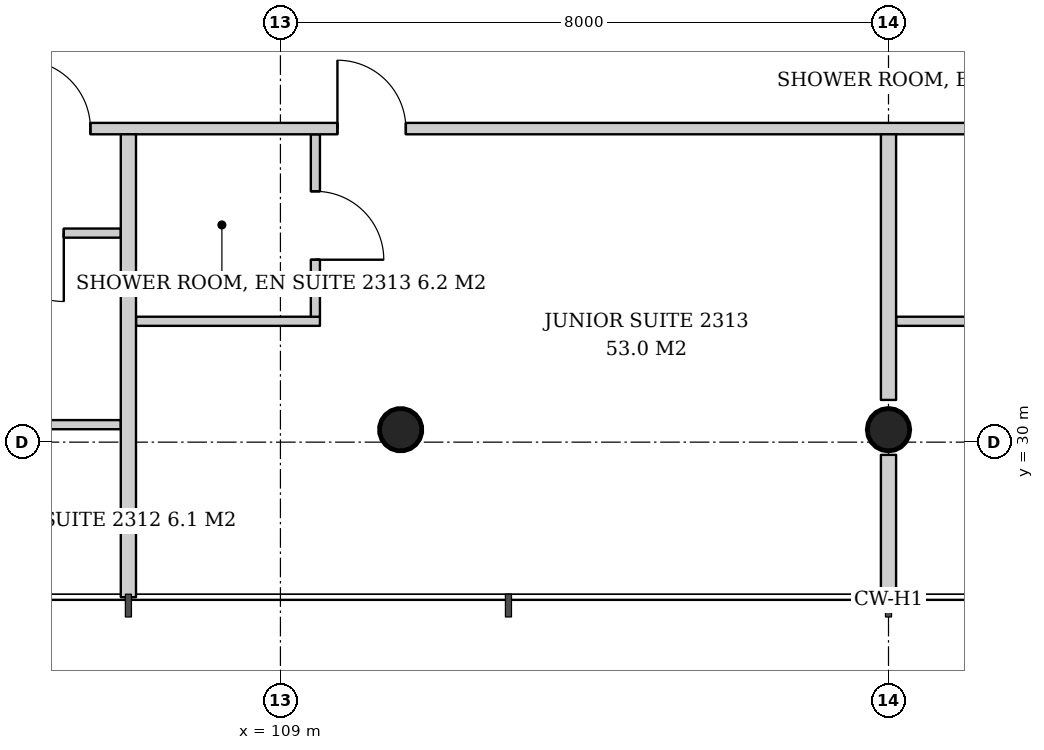
"""IFC4 building model, lengths in metres.
Left out: names, types, materials, properties, quantities, classifications, styles, units other than length and angle.
Written with IfcOpenShell. Run it as: python <this file> out.ifc"""

import sys

from ifc_helpers import new_model, si_unit, direction, frame, frame_2d, origin, origin_2d, place, context, subcontext, project, spatial, rectangle, hollow_circle, extrude, element, fill, save


model = new_model("IFC4")
c1 = context("Model", 3, precision=1e-05, world=origin(), true_north=direction((0.0, 1.0)))
c2 = subcontext(c1, "Body", "Model", "MODEL_VIEW")
j1 = project(units=[si_unit("LENGTHUNIT", "METRE"), si_unit("PLANEANGLEUNIT", "RADIAN")], contexts=[c1])
p1 = place(None, origin())
s1 = spatial("IfcSite", under=j1, at=p1, CompositionType="ELEMENT")
p2 = place(p1, origin())
s2 = spatial("IfcBuilding", under=s1, at=p2, CompositionType="ELEMENT")
p3 = place(p2, frame((0.0, 0.0, 93.2)))
s3 = spatial("IfcBuildingStorey", under=s2, at=p3, CompositionType="ELEMENT", Elevation=93.2)
p4 = place(p3, frame((110.556, 30.112, 0.0), z_axis=(0.021497706284, 0.043059584825, 0.998841188968), x_axis=(-0.894693706707, 0.446680166538, 0.0)))
e1 = element("IfcColumn", 1, at=p4, inside=s3, PredefinedType="COLUMN", context=c2, shape_type="SweptSolid", body=[
    extrude(hollow_circle(Radius=0.28, WallThickness=0.02, at=origin_2d()), origin(), (0.0, 0.0, 1.0), 3.804),
])
p5 = place(p3, frame((117.0, 30.112, 0.0), z_axis=(0.0, 0.043069538298, 0.999072076915), x_axis=(-1.0, 0.0, 0.0)))
e2 = element("IfcColumn", 2, at=p5, inside=s3, PredefinedType="COLUMN", context=c2, shape_type="SweptSolid", body=[
    extrude(hollow_circle(Radius=0.28, WallThickness=0.02, at=origin_2d()), origin(), (0.0, 0.0, 1.0), 3.803),
])
p6 = place(p3, frame((106.9, 32.75, 0.0), z_axis=(0.0, 0.0, 1.0), x_axis=(-1.0, 0.0, 0.0)))
e3 = element("IfcWall", 3, at=p6, inside=s3, PredefinedType="PARTITIONING", context=c2, shape_type="SweptSolid", body=[
    extrude(rectangle(XDim=2.58, YDim=0.12, at=frame_2d((1.29, 0.0))), origin(), (0.0, 0.0, 1.0), 3.2),
])
p7 = place(p6, frame((0.75, 0.0, 0.0)))
e4 = element("IfcOpeningElement", 4, at=p7, cuts=e3, PredefinedType="OPENING", context=c2, shape_type="SweptSolid", body=[
    extrude(rectangle(XDim=0.9, YDim=2.1, at=frame_2d((0.45, 1.05))), frame((0.0, 0.07, 0.0), z_axis=(0.0, -1.0, 0.0), x_axis=(1.0, 0.0, 0.0)), (0.0, 0.0, 1.0), 0.14),
])
p8 = place(p3, frame((106.9, 30.23, 0.0), z_axis=(0.0, 0.0, 1.0), x_axis=(-1.0, 0.0, 0.0)))
e5 = element("IfcWall", 5, at=p8, inside=s3, PredefinedType="PARTITIONING", context=c2, shape_type="SweptSolid", body=[
    extrude(rectangle(XDim=2.344, YDim=0.12, at=frame_2d((1.172, 0.0))), origin(), (0.0, 0.0, 1.0), 3.2),
])
p9 = place(p3, frame((107.1, 31.59, 0.0), z_axis=(0.0, 0.0, 1.0), x_axis=(1.0, 0.0, 0.0)))
e6 = element("IfcWall", 6, at=p9, inside=s3, PredefinedType="PARTITIONING", context=c2, shape_type="SweptSolid", body=[
    extrude(rectangle(XDim=2.42, YDim=0.12, at=frame_2d((1.21, 0.0))), origin(), (0.0, 0.0, 1.0), 2.9),
])
p10 = place(p3, frame((109.46, 34.05, 0.0), z_axis=(0.0, 0.0, 1.0), x_axis=(0.0, -1.0, 0.0)))
e7 = element("IfcWall", 7, at=p10, inside=s3, PredefinedType="PARTITIONING", context=c2, shape_type="SweptSolid", body=[
    extrude(rectangle(XDim=2.4, YDim=0.12, at=frame_2d((1.2, 0.0))), origin(), (0.0, 0.0, 1.0), 3.6),
])
p11 = place(p10, frame((0.75, 0.0, 0.0)))
e8 = element("IfcOpeningElement", 8, at=p11, cuts=e7, PredefinedType="OPENING", context=c2, shape_type="SweptSolid", body=[
    extrude(rectangle(XDim=0.9, YDim=2.1, at=frame_2d((0.45, 1.05))), frame((0.0, 0.07, 0.0), z_axis=(0.0, -1.0, 0.0), x_axis=(1.0, 0.0, 0.0)), (0.0, 0.0, 1.0), 0.14),
])
p12 = place(p3, frame((117.1, 31.59, 0.0), z_axis=(0.0, 0.0, 1.0), x_axis=(1.0, 0.0, 0.0)))
e9 = element("IfcWall", 9, at=p12, inside=s3, PredefinedType="PARTITIONING", context=c2, shape_type="SweptSolid", body=[
    extrude(rectangle(XDim=2.42, YDim=0.12, at=frame_2d((1.21, 0.0))), origin(), (0.0, 0.0, 1.0), 3.6),
])
p13 = place(p3, frame((105.209, 34.125, 0.0), z_axis=(0.0, 0.0, 1.0), x_axis=(1.0, 0.0, 0.0)))
e10 = element("IfcWall", 10, at=p13, inside=s3, PredefinedType="PARTITIONING", context=c2, shape_type="SweptSolid", body=[
    extrude(rectangle(XDim=23.583, YDim=0.15, at=frame_2d((11.791, 0.0))), origin(), (0.0, 0.0, 1.0), 2.9),
])
p14 = place(p13, frame((0.391, 0.0, 0.0)))
e11 = element("IfcOpeningElement", 11, at=p14, cuts=e10, PredefinedType="OPENING", context=c2, shape_type="SweptSolid", body=[
    extrude(rectangle(XDim=0.9, YDim=2.1, at=frame_2d((0.45, 1.05))), frame((0.0, 0.085, 0.0), z_axis=(0.0, -1.0, 0.0), x_axis=(1.0, 0.0, 0.0)), (0.0, 0.0, 1.0), 0.17),
])
p15 = place(p13, frame((4.541, 0.0, 0.0)))
e12 = element("IfcOpeningElement", 12, at=p15, cuts=e10, PredefinedType="OPENING", context=c2, shape_type="SweptSolid", body=[
    extrude(rectangle(XDim=0.9, YDim=2.1, at=frame_2d((0.45, 1.05))), frame((0.0, 0.085, 0.0), z_axis=(0.0, -1.0, 0.0), x_axis=(1.0, 0.0, 0.0)), (0.0, 0.0, 1.0), 0.17),
])
p16 = place(p13, frame((14.541, 0.0, 0.0)))
e13 = element("IfcOpeningElement", 13, at=p16, cuts=e10, PredefinedType="OPENING", context=c2, shape_type="SweptSolid", body=[
    extrude(rectangle(XDim=0.9, YDim=2.1, at=frame_2d((0.45, 1.05))), frame((0.0, 0.085, 0.0), z_axis=(0.0, -1.0, 0.0), x_axis=(1.0, 0.0, 0.0)), (0.0, 0.0, 1.0), 0.17),
])
p17 = place(p13, frame((18.141, 0.0, 0.0)))
e14 = element("IfcOpeningElement", 14, at=p17, cuts=e10, PredefinedType="OPENING", context=c2, shape_type="SweptSolid", body=[
    extrude(rectangle(XDim=0.9, YDim=2.1, at=frame_2d((0.45, 1.05))), frame((0.0, 0.085, 0.0), z_axis=(0.0, -1.0, 0.0), x_axis=(1.0, 0.0, 0.0)), (0.0, 0.0, 1.0), 0.17),
])
p18 = place(p3, frame((107.0, 34.05, 0.0), z_axis=(0.0, 0.0, 1.0), x_axis=(0.0, -1.0, 0.0)))
e15 = element("IfcWall", 15, at=p18, inside=s3, PredefinedType="PARTITIONING", context=c2, shape_type="SweptSolid", body=[
    extrude(rectangle(XDim=6.09, YDim=0.2, at=frame_2d((3.045, 0.0))), origin(), (0.0, 0.0, 1.0), 3.2),
])
p19 = place(p3, frame((117.0, 34.05, 0.0), z_axis=(0.0, 0.0, 1.0), x_axis=(0.0, -1.0, 0.0)))
e16 = element("IfcWall", 16, at=p19, inside=s3, PredefinedType="PARTITIONING", context=c2, shape_type="SweptSolid", body=[
    extrude(rectangle(XDim=3.495, YDim=0.2, at=frame_2d((1.747, 0.0))), origin(), (0.0, 0.0, 1.0), 3.6),
])
p20 = place(p3, frame((117.0, 29.833, 0.0), z_axis=(0.0, 0.0, 1.0), x_axis=(0.0, -1.0, 0.0)))
e17 = element("IfcWall", 17, at=p20, inside=s3, PredefinedType="PARTITIONING", context=c2, shape_type="SweptSolid", body=[
    extrude(rectangle(XDim=1.873, YDim=0.2, at=frame_2d((0.936, 0.0))), origin(), (0.0, 0.0, 1.0), 3.6),
])
p21 = place(p7, origin())
e18 = element("IfcDoor", 18, at=p21, inside=s3, OperationType="SINGLE_SWING_LEFT", PredefinedType="DOOR", context=c2, shape_type="SweptSolid", body=[
    extrude(rectangle(XDim=0.9, YDim=2.1, at=frame_2d((0.45, 1.05))), frame((0.0, 0.025, 0.0), z_axis=(0.0, -1.0, 0.0), x_axis=(1.0, 0.0, 0.0)), (0.0, 0.0, 1.0), 0.05),
])
fill(e4, e18)
p22 = place(p11, origin())
e19 = element("IfcDoor", 19, at=p22, inside=s3, OperationType="SINGLE_SWING_RIGHT", PredefinedType="DOOR", context=c2, shape_type="SweptSolid", body=[
    extrude(rectangle(XDim=0.9, YDim=2.1, at=frame_2d((0.45, 1.05))), frame((0.0, 0.025, 0.0), z_axis=(0.0, -1.0, 0.0), x_axis=(1.0, 0.0, 0.0)), (0.0, 0.0, 1.0), 0.05),
])
fill(e8, e19)
p23 = place(p14, origin())
e20 = element("IfcDoor", 20, at=p23, inside=s3, OperationType="SINGLE_SWING_LEFT", PredefinedType="DOOR", context=c2, shape_type="SweptSolid", body=[
    extrude(rectangle(XDim=0.9, YDim=2.1, at=frame_2d((0.45, 1.05))), frame((0.0, 0.025, 0.0), z_axis=(0.0, -1.0, 0.0), x_axis=(1.0, 0.0, 0.0)), (0.0, 0.0, 1.0), 0.05),
])
fill(e11, e20)
p24 = place(p15, origin())
e21 = element("IfcDoor", 21, at=p24, inside=s3, OperationType="SINGLE_SWING_LEFT", PredefinedType="DOOR", context=c2, shape_type="SweptSolid", body=[
    extrude(rectangle(XDim=0.9, YDim=2.1, at=frame_2d((0.45, 1.05))), frame((0.0, 0.025, 0.0), z_axis=(0.0, -1.0, 0.0), x_axis=(1.0, 0.0, 0.0)), (0.0, 0.0, 1.0), 0.05),
])
fill(e12, e21)
save(model, sys.argv[1])
